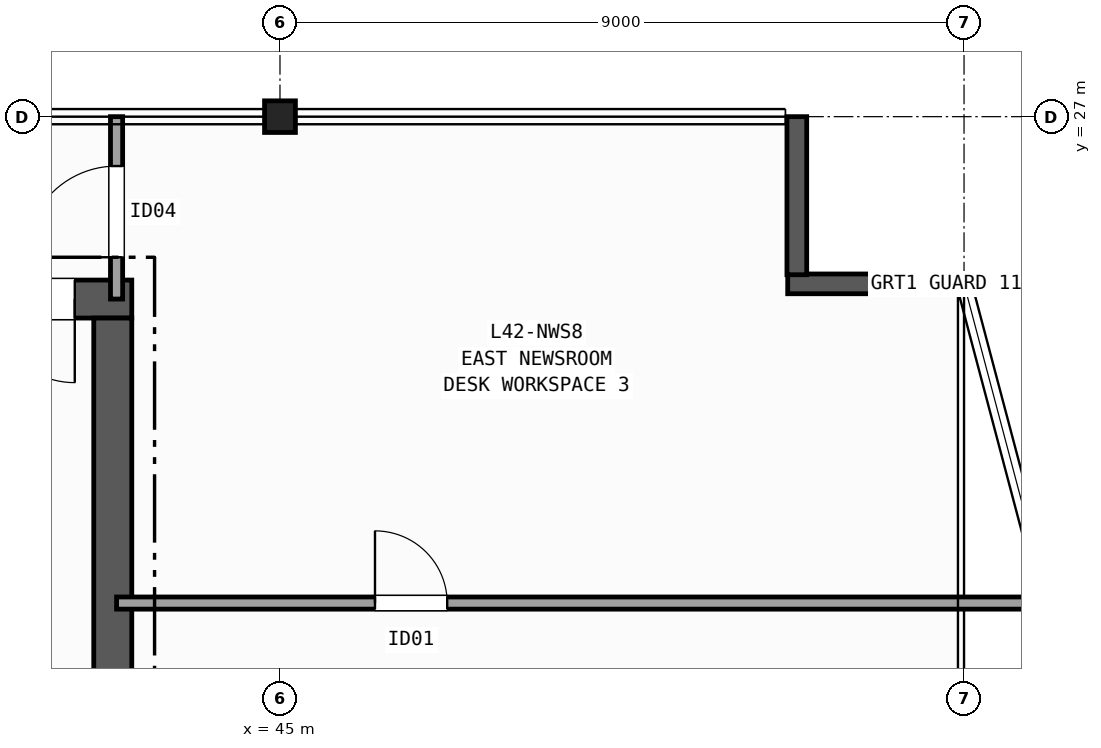
"""IFC4 building model, lengths in metres.
Left out: names, types, materials, properties, quantities, classifications, styles, units other than length and angle.
Written with IfcOpenShell. Run it as: python <this file> out.ifc"""

import sys

from ifc_helpers import new_model, si_unit, direction, frame, frame_2d, origin, origin_2d, place, context, subcontext, project, spatial, rectangle, i_section, extrude, element, fill, save


model = new_model("IFC4")
c1 = context("Model", 3, precision=1e-05, world=origin(), true_north=direction((0.0, 1.0)))
c2 = subcontext(c1, "Body", "Model", "MODEL_VIEW")
j1 = project(units=[si_unit("LENGTHUNIT", "METRE"), si_unit("PLANEANGLEUNIT", "RADIAN")], contexts=[c1])
p1 = place(None, origin())
s1 = spatial("IfcSite", under=j1, at=p1, CompositionType="ELEMENT")
p2 = place(p1, origin())
s2 = spatial("IfcBuilding", under=s1, at=p2, CompositionType="ELEMENT")
p3 = place(p2, frame((0.0, 0.0, 169.2)))
s3 = spatial("IfcBuildingStorey", under=s2, at=p3, CompositionType="ELEMENT", Elevation=169.2)
p4 = place(p3, frame((45.0, 27.0, 0.0), z_axis=(0.0, 0.0, 1.0), x_axis=(1.0, 0.0, 0.0)))
e1 = element("IfcColumn", 1, at=p4, inside=s3, PredefinedType="COLUMN", context=c2, shape_type="SweptSolid", body=[
    extrude(i_section(OverallWidth=0.406, OverallDepth=0.416, WebThickness=0.03, FlangeThickness=0.048, FilletRadius=0.015, at=origin_2d()), origin(), (0.0, 0.0, 1.0), 5.0),
])
p5 = place(p3, frame((54.0, 24.8, 0.0), z_axis=(0.0, 0.0, 1.0), x_axis=(-1.0, 0.0, 0.0)))
e2 = element("IfcWall", 2, at=p5, inside=s3, PredefinedType="SOLIDWALL", context=c2, shape_type="SweptSolid", body=[
    extrude(rectangle(XDim=2.32, YDim=0.26, at=frame_2d((1.16, 0.0))), origin(), (0.0, 0.0, 1.0), 4.72),
])
p6 = place(p3, frame((51.8, 24.92, 0.0), z_axis=(0.0, 0.0, 1.0), x_axis=(0.0, 1.0, 0.0)))
e3 = element("IfcWall", 3, at=p6, inside=s3, PredefinedType="SOLIDWALL", context=c2, shape_type="SweptSolid", body=[
    extrude(rectangle(XDim=2.08, YDim=0.26, at=frame_2d((1.04, 0.0))), origin(), (0.0, 0.0, 1.0), 4.72),
])
p7 = place(p3, frame((43.05, 24.6, 0.0), z_axis=(0.0, 0.0, 1.0), x_axis=(-1.0, 0.0, 0.0)))
e4 = element("IfcWall", 4, at=p7, inside=s3, PredefinedType="SHEAR", context=c2, shape_type="SweptSolid", body=[
    extrude(rectangle(XDim=13.9, YDim=0.5, at=frame_2d((6.95, 0.0))), origin(), (0.0, 0.0, 1.0), 4.72),
])
p8 = place(p7, frame((0.75, 0.0, 0.0)))
e5 = element("IfcOpeningElement", 5, at=p8, cuts=e4, PredefinedType="OPENING", context=c2, shape_type="SweptSolid", body=[
    extrude(rectangle(XDim=1.1, YDim=2.15, at=frame_2d((0.55, 1.075))), frame((0.0, 0.26, 0.0), z_axis=(0.0, -1.0, 0.0), x_axis=(1.0, 0.0, 0.0)), (0.0, 0.0, 1.0), 0.52),
])
p9 = place(p7, frame((2.7, 0.0, 0.0)))
e6 = element("IfcOpeningElement", 6, at=p9, cuts=e4, PredefinedType="OPENING", context=c2, shape_type="SweptSolid", body=[
    extrude(rectangle(XDim=0.9, YDim=2.1, at=frame_2d((0.45, 1.05))), frame((0.0, 0.26, 0.0), z_axis=(0.0, -1.0, 0.0), x_axis=(1.0, 0.0, 0.0)), (0.0, 0.0, 1.0), 0.52),
])
p10 = place(p7, frame((4.6, 0.0, 0.0)))
e7 = element("IfcOpeningElement", 7, at=p10, cuts=e4, PredefinedType="OPENING", context=c2, shape_type="SweptSolid", body=[
    extrude(rectangle(XDim=0.9, YDim=2.1, at=frame_2d((0.45, 1.05))), frame((0.0, 0.26, 0.0), z_axis=(0.0, -1.0, 0.0), x_axis=(1.0, 0.0, 0.0)), (0.0, 0.0, 1.0), 0.52),
])
p11 = place(p3, frame((42.8, 11.45, 0.0), z_axis=(0.0, 0.0, 1.0), x_axis=(0.0, 1.0, 0.0)))
e8 = element("IfcWall", 8, at=p11, inside=s3, PredefinedType="SHEAR", context=c2, shape_type="SweptSolid", body=[
    extrude(rectangle(XDim=12.9, YDim=0.5, at=frame_2d((6.45, 0.0))), origin(), (0.0, 0.0, 1.0), 4.72),
])
p12 = place(p3, frame((42.85, 24.6, 0.0), z_axis=(0.0, 0.0, 1.0), x_axis=(0.0, 1.0, 0.0)))
e9 = element("IfcWall", 9, at=p12, inside=s3, PredefinedType="PARTITIONING", context=c2, shape_type="SweptSolid", body=[
    extrude(rectangle(XDim=2.4, YDim=0.16, at=frame_2d((1.2, 0.0))), origin(), (0.0, 0.0, 1.0), 3.934),
])
p13 = place(p12, frame((0.55, 0.0, 0.0)))
e10 = element("IfcOpeningElement", 10, at=p13, cuts=e9, PredefinedType="OPENING", context=c2, shape_type="SweptSolid", body=[
    extrude(rectangle(XDim=1.2, YDim=2.15, at=frame_2d((0.6, 1.075))), frame((0.0, 0.09, 0.0), z_axis=(0.0, -1.0, 0.0), x_axis=(1.0, 0.0, 0.0)), (0.0, 0.0, 1.0), 0.18),
])
p14 = place(p3, frame((42.85, 20.6, 0.0), z_axis=(0.0, 0.0, 1.0), x_axis=(1.0, 0.0, 0.0)))
e11 = element("IfcWall", 11, at=p14, inside=s3, PredefinedType="PARTITIONING", context=c2, shape_type="SweptSolid", body=[
    extrude(rectangle(XDim=12.262, YDim=0.16, at=frame_2d((6.131, 0.0))), origin(), (0.0, 0.0, 1.0), 4.092),
])
p15 = place(p14, frame((3.4, 0.0, 0.0)))
e12 = element("IfcOpeningElement", 12, at=p15, cuts=e11, PredefinedType="OPENING", context=c2, shape_type="SweptSolid", body=[
    extrude(rectangle(XDim=0.95, YDim=2.1, at=frame_2d((0.475, 1.05))), frame((0.0, 0.09, 0.0), z_axis=(0.0, -1.0, 0.0), x_axis=(1.0, 0.0, 0.0)), (0.0, 0.0, 1.0), 0.18),
])
p16 = place(p8, origin())
e13 = element("IfcDoor", 13, at=p16, inside=s3, OperationType="SINGLE_SWING_LEFT", PredefinedType="DOOR", context=c2, shape_type="SweptSolid", body=[
    extrude(rectangle(XDim=1.1, YDim=2.15, at=frame_2d((0.55, 1.075))), frame((0.0, 0.025, 0.0), z_axis=(0.0, -1.0, 0.0), x_axis=(1.0, 0.0, 0.0)), (0.0, 0.0, 1.0), 0.05),
])
fill(e5, e13)
p17 = place(p13, origin())
e14 = element("IfcDoor", 14, at=p17, inside=s3, OperationType="SINGLE_SWING_LEFT", PredefinedType="DOOR", context=c2, shape_type="SweptSolid", body=[
    extrude(rectangle(XDim=1.2, YDim=2.15, at=frame_2d((0.6, 1.075))), frame((0.0, 0.025, 0.0), z_axis=(0.0, -1.0, 0.0), x_axis=(1.0, 0.0, 0.0)), (0.0, 0.0, 1.0), 0.05),
])
fill(e10, e14)
p18 = place(p15, origin())
e15 = element("IfcDoor", 15, at=p18, inside=s3, OperationType="SINGLE_SWING_LEFT", PredefinedType="DOOR", context=c2, shape_type="SweptSolid", body=[
    extrude(rectangle(XDim=0.95, YDim=2.1, at=frame_2d((0.475, 1.05))), frame((0.0, 0.025, 0.0), z_axis=(0.0, -1.0, 0.0), x_axis=(1.0, 0.0, 0.0)), (0.0, 0.0, 1.0), 0.05),
])
fill(e12, e15)
save(model, sys.argv[1])
